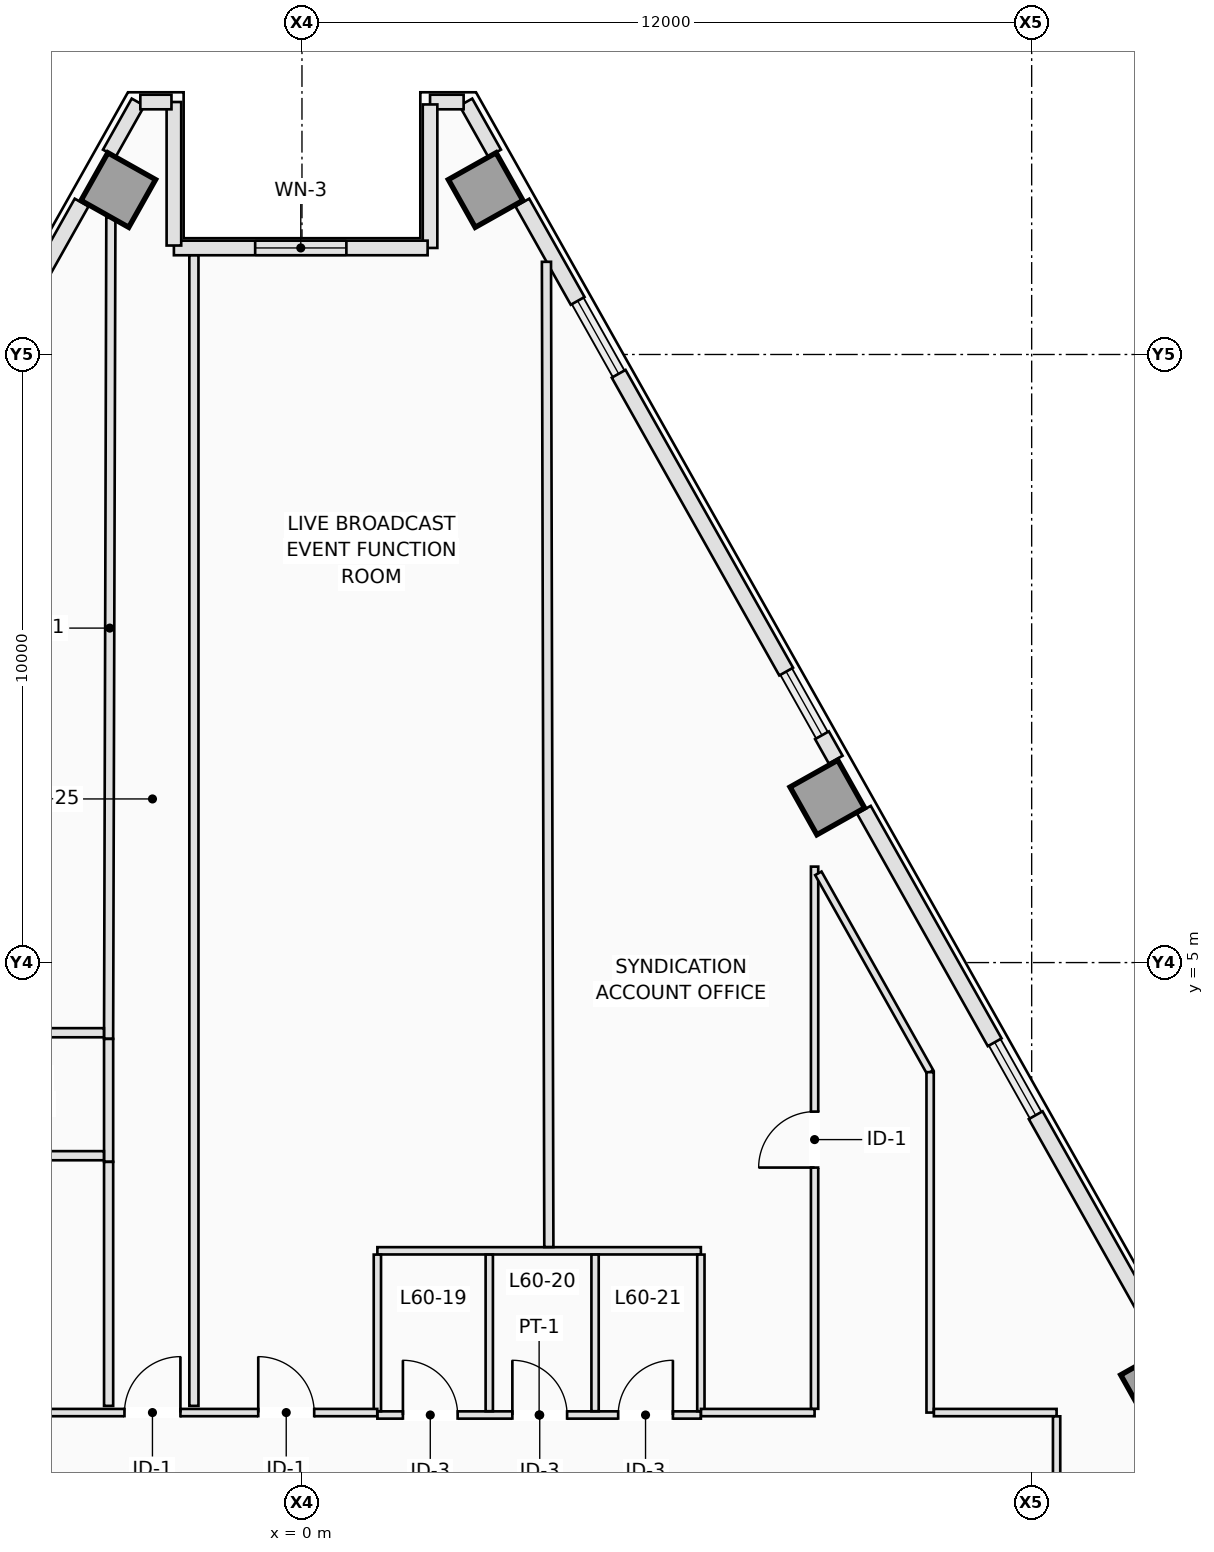
"""IFC4 building model, lengths in metres.
Left out: names, types, materials, properties, quantities, classifications, styles, units other than length and angle.
Written with IfcOpenShell. Run it as: python <this file> out.ifc"""

import sys

from ifc_helpers import new_model, si_unit, direction, frame, frame_2d, origin, origin_2d, place, context, subcontext, project, spatial, rectangle, extrude, element, fill, save


model = new_model("IFC4")
c1 = context("Model", 3, precision=1e-05, world=origin(), true_north=direction((0.0, 1.0)))
c2 = subcontext(c1, "Body", "Model", "MODEL_VIEW")
j1 = project(units=[si_unit("LENGTHUNIT", "METRE"), si_unit("PLANEANGLEUNIT", "RADIAN")], contexts=[c1])
p1 = place(None, origin())
s1 = spatial("IfcSite", under=j1, at=p1, CompositionType="ELEMENT")
p2 = place(p1, origin())
s2 = spatial("IfcBuilding", under=s1, at=p2, CompositionType="ELEMENT")
p3 = place(p2, frame((0.0, 0.0, 218.4)))
s3 = spatial("IfcBuildingStorey", under=s2, at=p3, CompositionType="ELEMENT", Elevation=218.4)
for number, where, z_axis, x_axis in (
    (1, (14.077, -1.952, 0.0), (0.0, 0.0, 1.0), (0.872, 0.49, 0.0)),
    (2, (8.64, 7.715, 0.0), (0.0, 0.0, 1.0), (0.872, 0.49, 0.0)),
    (3, (3.021, 17.704, 0.0), (0.0, 0.0, 1.0), (0.872, 0.49, 0.0)),
    (4, (-3.021, 17.704, 0.0), (0.0, 0.0, 1.0), (-0.872, 0.49, 0.0)),
):
    element("IfcColumn", number, at=place(p3, frame(where, z_axis=z_axis, x_axis=x_axis)), inside=s3, PredefinedType="COLUMN", context=c2, shape_type="SweptSolid", body=[
        extrude(rectangle(XDim=0.9, YDim=0.9, at=origin_2d()), origin(), (0.0, 0.0, 1.0), 3.5),
    ])
p4 = place(p3, frame((2.695, 19.149, 0.0), z_axis=(0.0, 0.0, 1.0), x_axis=(0.490345412687, -0.87152818443, 0.0)))
e5 = element("IfcWall", 5, at=p4, inside=s3, PredefinedType="STANDARD", context=c2, shape_type="SweptSolid", body=[
    extrude(rectangle(XDim=0.964, YDim=0.24, at=frame_2d((0.482, 0.0))), origin(), (0.0, 0.0, 1.0), 3.25),
])
p5 = place(p3, frame((3.624, 17.499, 0.0), z_axis=(0.0, 0.0, 1.0), x_axis=(0.490261239633, -0.871575537125, 0.0)))
e6 = element("IfcWall", 6, at=p5, inside=s3, PredefinedType="STANDARD", context=c2, shape_type="SweptSolid", body=[
    extrude(rectangle(XDim=1.855, YDim=0.26, at=frame_2d((0.928, 0.0))), origin(), (0.0, 0.0, 1.0), 3.25),
])
p6 = place(p3, frame((5.208, 14.682, 0.0), z_axis=(0.0, 0.0, 1.0), x_axis=(0.490240608828, -0.871587141631, 0.0)))
e7 = element("IfcWall", 7, at=p6, inside=s3, PredefinedType="STANDARD", context=c2, shape_type="SweptSolid", body=[
    extrude(rectangle(XDim=5.618, YDim=0.26, at=frame_2d((2.809, 0.0))), origin(), (0.0, 0.0, 1.0), 3.25),
])
p7 = place(p3, frame((8.552, 8.738, 0.0), z_axis=(0.0, 0.0, 1.0), x_axis=(0.490412424957, -0.871490478116, 0.0)))
e8 = element("IfcWall", 8, at=p7, inside=s3, PredefinedType="STANDARD", context=c2, shape_type="SweptSolid", body=[
    extrude(rectangle(XDim=0.46, YDim=0.26, at=frame_2d((0.23, 0.0))), origin(), (0.0, 0.0, 1.0), 3.25),
])
p8 = place(p3, frame((9.24, 7.514, 0.0), z_axis=(0.0, 0.0, 1.0), x_axis=(0.490237464814, -0.871588910033, 0.0)))
e9 = element("IfcWall", 9, at=p8, inside=s3, PredefinedType="STANDARD", context=c2, shape_type="SweptSolid", body=[
    extrude(rectangle(XDim=4.388, YDim=0.26, at=frame_2d((2.194, 0.0))), origin(), (0.0, 0.0, 1.0), 3.25),
])
p9 = place(p3, frame((12.066, 2.49, 0.0), z_axis=(0.0, 0.0, 1.0), x_axis=(0.490261239633, -0.871575537125, 0.0)))
e10 = element("IfcWall", 10, at=p9, inside=s3, PredefinedType="STANDARD", context=c2, shape_type="SweptSolid", body=[
    extrude(rectangle(XDim=4.388, YDim=0.26, at=frame_2d((2.194, 0.0))), origin(), (0.0, 0.0, 1.0), 3.25),
])
p10 = place(p3, frame((-3.168, 18.309, 0.0), z_axis=(0.0, 0.0, 1.0), x_axis=(0.490345412687, 0.87152818443, 0.0)))
e11 = element("IfcWall", 11, at=p10, inside=s3, PredefinedType="STANDARD", context=c2, shape_type="SweptSolid", body=[
    extrude(rectangle(XDim=0.964, YDim=0.24, at=frame_2d((0.482, 0.0))), origin(), (0.0, 0.0, 1.0), 3.25),
])
p11 = place(p3, frame((-4.533, 15.882, 0.0), z_axis=(0.0, 0.0, 1.0), x_axis=(0.490261239633, 0.871575537125, 0.0)))
e12 = element("IfcWall", 12, at=p11, inside=s3, PredefinedType="STANDARD", context=c2, shape_type="SweptSolid", body=[
    extrude(rectangle(XDim=1.855, YDim=0.26, at=frame_2d((0.928, 0.0))), origin(), (0.0, 0.0, 1.0), 3.25),
])
p12 = place(p3, frame((2.658, 19.152, 0.0), z_axis=(0.0, 0.0, 1.0), x_axis=(-1.0, 0.0, 0.0)))
e13 = element("IfcWall", 13, at=p12, inside=s3, PredefinedType="STANDARD", context=c2, shape_type="SweptSolid", body=[
    extrude(rectangle(XDim=0.552, YDim=0.24, at=frame_2d((0.276, 0.0))), origin(), (0.0, 0.0, 1.0), 3.25),
])
p13 = place(p3, frame((2.106, 19.112, 0.0), z_axis=(0.0, 0.0, 1.0), x_axis=(0.0, -1.0, 0.0)))
e14 = element("IfcWall", 14, at=p13, inside=s3, PredefinedType="STANDARD", context=c2, shape_type="SweptSolid", body=[
    extrude(rectangle(XDim=2.36, YDim=0.24, at=frame_2d((1.18, 0.0))), origin(), (0.0, 0.0, 1.0), 3.25),
])
p14 = place(p3, frame((2.066, 16.752, 0.0), z_axis=(0.0, 0.0, 1.0), x_axis=(-1.0, 0.0, 0.0)))
e15 = element("IfcWall", 15, at=p14, inside=s3, PredefinedType="STANDARD", context=c2, shape_type="SweptSolid", body=[
    extrude(rectangle(XDim=4.172, YDim=0.24, at=frame_2d((2.086, 0.0))), origin(), (0.0, 0.0, 1.0), 3.25),
])
p15 = place(p14, frame((1.336, 0.0, 0.9)))
e16 = element("IfcOpeningElement", 16, at=p15, cuts=e15, PredefinedType="OPENING", context=c2, shape_type="SweptSolid", body=[
    extrude(rectangle(XDim=1.5, YDim=1.95, at=frame_2d((0.75, 0.975))), frame((0.0, 0.13, 0.0), z_axis=(0.0, -1.0, 0.0), x_axis=(1.0, 0.0, 0.0)), (0.0, 0.0, 1.0), 0.26),
])
p16 = place(p3, frame((-2.106, 16.792, 0.0), z_axis=(0.0, 0.0, 1.0), x_axis=(0.0, 1.0, 0.0)))
e17 = element("IfcWall", 17, at=p16, inside=s3, PredefinedType="STANDARD", context=c2, shape_type="SweptSolid", body=[
    extrude(rectangle(XDim=2.36, YDim=0.24, at=frame_2d((1.18, 0.0))), origin(), (0.0, 0.0, 1.0), 3.25),
])
p17 = place(p3, frame((-2.146, 19.152, 0.0), z_axis=(0.0, 0.0, 1.0), x_axis=(-1.0, 0.0, 0.0)))
e18 = element("IfcWall", 18, at=p17, inside=s3, PredefinedType="STANDARD", context=c2, shape_type="SweptSolid", body=[
    extrude(rectangle(XDim=0.512, YDim=0.24, at=frame_2d((0.256, 0.0))), origin(), (0.0, 0.0, 1.0), 3.25),
])
p18 = place(p3, frame((1.24, -2.44, 0.0), z_axis=(0.0, 0.0, 1.0), x_axis=(1.0, 0.0, 0.0)))
e19 = element("IfcWall", 19, at=p18, inside=s3, PredefinedType="PARTITIONING", context=c2, shape_type="SweptSolid", body=[
    extrude(rectangle(XDim=5.32, YDim=0.12, at=frame_2d((2.66, 0.0))), origin(), (0.0, 0.0, 1.0), 2.943),
])
p19 = place(p18, frame((0.42, 0.0, 0.0)))
e20 = element("IfcOpeningElement", 20, at=p19, cuts=e19, PredefinedType="OPENING", context=c2, shape_type="SweptSolid", body=[
    extrude(rectangle(XDim=0.9, YDim=2.12, at=frame_2d((0.45, 1.06))), frame((0.0, 0.07, 0.0), z_axis=(0.0, -1.0, 0.0), x_axis=(1.0, 0.0, 0.0)), (0.0, 0.0, 1.0), 0.14),
])
p20 = place(p18, frame((2.22, 0.0, 0.0)))
e21 = element("IfcOpeningElement", 21, at=p20, cuts=e19, PredefinedType="OPENING", context=c2, shape_type="SweptSolid", body=[
    extrude(rectangle(XDim=0.9, YDim=2.12, at=frame_2d((0.45, 1.06))), frame((0.0, 0.07, 0.0), z_axis=(0.0, -1.0, 0.0), x_axis=(1.0, 0.0, 0.0)), (0.0, 0.0, 1.0), 0.14),
])
p21 = place(p18, frame((3.96, 0.0, 0.0)))
e22 = element("IfcOpeningElement", 22, at=p21, cuts=e19, PredefinedType="OPENING", context=c2, shape_type="SweptSolid", body=[
    extrude(rectangle(XDim=0.9, YDim=2.12, at=frame_2d((0.45, 1.06))), frame((0.0, 0.07, 0.0), z_axis=(0.0, -1.0, 0.0), x_axis=(1.0, 0.0, 0.0)), (0.0, 0.0, 1.0), 0.14),
])
p22 = place(p3, frame((1.24, 0.26, 0.0), z_axis=(0.0, 0.0, 1.0), x_axis=(1.0, 0.0, 0.0)))
e23 = element("IfcWall", 23, at=p22, inside=s3, PredefinedType="PARTITIONING", context=c2, shape_type="SweptSolid", body=[
    extrude(rectangle(XDim=5.32, YDim=0.12, at=frame_2d((2.66, 0.0))), origin(), (0.0, 0.0, 1.0), 3.25),
])
for number, where, z_axis, x_axis in (
    (24, (1.24, -2.378, 0.0), (0.0, 0.0, 1.0), (0.0, 1.0, 0.0)),
    (25, (3.08, -2.378, 0.0), (0.0, 0.0, 1.0), (0.0, 1.0, 0.0)),
    (26, (4.82, -2.378, 0.0), (0.0, 0.0, 1.0), (0.0, 1.0, 0.0)),
    (27, (6.56, -2.378, 0.0), (0.0, 0.0, 1.0), (0.0, 1.0, 0.0)),
):
    element("IfcWall", number, at=place(p3, frame(where, z_axis=z_axis, x_axis=x_axis)), inside=s3, PredefinedType="PARTITIONING", context=c2, shape_type="SweptSolid", body=[
        extrude(rectangle(XDim=2.576, YDim=0.12, at=frame_2d((1.288, 0.0))), origin(), (0.0, 0.0, 1.0), 3.25),
    ])
p23 = place(p3, frame((-8.508, -2.4, 0.0), z_axis=(0.0, 0.0, 1.0), x_axis=(1.0, 0.0, 0.0)))
e28 = element("IfcWall", 28, at=p23, inside=s3, PredefinedType="PARTITIONING", context=c2, shape_type="SweptSolid", body=[
    extrude(rectangle(XDim=9.746, YDim=0.12, at=frame_2d((4.873, 0.0))), origin(), (0.0, 0.0, 1.0), 2.943),
])
p24 = place(p23, frame((7.789, 0.0, 0.0)))
e29 = element("IfcOpeningElement", 29, at=p24, cuts=e28, PredefinedType="OPENING", context=c2, shape_type="SweptSolid", body=[
    extrude(rectangle(XDim=0.92, YDim=2.12, at=frame_2d((0.46, 1.06))), frame((0.0, 0.07, 0.0), z_axis=(0.0, -1.0, 0.0), x_axis=(1.0, 0.0, 0.0)), (0.0, 0.0, 1.0), 0.14),
])
p25 = place(p23, frame((5.589, 0.0, 0.0)))
e30 = element("IfcOpeningElement", 30, at=p25, cuts=e28, PredefinedType="OPENING", context=c2, shape_type="SweptSolid", body=[
    extrude(rectangle(XDim=0.92, YDim=2.12, at=frame_2d((0.46, 1.06))), frame((0.0, 0.07, 0.0), z_axis=(0.0, -1.0, 0.0), x_axis=(1.0, 0.0, 0.0)), (0.0, 0.0, 1.0), 0.14),
])
p26 = place(p23, frame((2.302, 0.0, 0.0)))
e31 = element("IfcOpeningElement", 31, at=p26, cuts=e28, PredefinedType="OPENING", context=c2, shape_type="SweptSolid", body=[
    extrude(rectangle(XDim=0.92, YDim=2.12, at=frame_2d((0.46, 1.06))), frame((0.0, 0.07, 0.0), z_axis=(0.0, -1.0, 0.0), x_axis=(1.0, 0.0, 0.0)), (0.0, 0.0, 1.0), 0.14),
])
p27 = place(p3, frame((6.562, -2.4, 0.0), z_axis=(0.0, 0.0, 1.0), x_axis=(1.0, 0.0, 0.0)))
e32 = element("IfcWall", 32, at=p27, inside=s3, PredefinedType="PARTITIONING", context=c2, shape_type="SweptSolid", body=[
    extrude(rectangle(XDim=1.868, YDim=0.12, at=frame_2d((0.934, 0.0))), origin(), (0.0, 0.0, 1.0), 3.25),
])
p28 = place(p3, frame((8.43, -2.338, 0.0), z_axis=(0.0, 0.0, 1.0), x_axis=(0.0, 1.0, 0.0)))
e33 = element("IfcWall", 33, at=p28, inside=s3, PredefinedType="PARTITIONING", context=c2, shape_type="SweptSolid", body=[
    extrude(rectangle(XDim=8.916, YDim=0.12, at=frame_2d((4.458, 0.0))), origin(), (0.0, 0.0, 1.0), 3.25),
])
p29 = place(p28, frame((3.967, 0.0, 0.0)))
e34 = element("IfcOpeningElement", 34, at=p29, cuts=e33, PredefinedType="OPENING", context=c2, shape_type="SweptSolid", body=[
    extrude(rectangle(XDim=0.92, YDim=2.12, at=frame_2d((0.46, 1.06))), frame((0.0, 0.07, 0.0), z_axis=(0.0, -1.0, 0.0), x_axis=(1.0, 0.0, 0.0)), (0.0, 0.0, 1.0), 0.14),
])
p30 = place(p3, frame((8.492, 6.468, 0.0), z_axis=(0.0, 0.0, 1.0), x_axis=(0.49025814807, -0.871577276121, 0.0)))
e35 = element("IfcWall", 35, at=p30, inside=s3, PredefinedType="PARTITIONING", context=c2, shape_type="SweptSolid", body=[
    extrude(rectangle(XDim=3.749, YDim=0.12, at=frame_2d((1.875, 0.0))), origin(), (0.0, 0.0, 1.0), 3.25),
])
p31 = place(p3, frame((10.33, 3.198, 0.0), z_axis=(0.0, 0.0, 1.0), x_axis=(0.0, -1.0, 0.0)))
e36 = element("IfcWall", 36, at=p31, inside=s3, PredefinedType="PARTITIONING", context=c2, shape_type="SweptSolid", body=[
    extrude(rectangle(XDim=5.598, YDim=0.12, at=frame_2d((2.799, 0.0))), origin(), (0.0, 0.0, 1.0), 3.25),
])
p32 = place(p3, frame((10.392, -2.4, 0.0), z_axis=(0.0, 0.0, 1.0), x_axis=(1.0, 0.0, 0.0)))
e37 = element("IfcWall", 37, at=p32, inside=s3, PredefinedType="PARTITIONING", context=c2, shape_type="SweptSolid", body=[
    extrude(rectangle(XDim=2.018, YDim=0.12, at=frame_2d((1.009, 0.0))), origin(), (0.0, 0.0, 1.0), 3.25),
])
p33 = place(p3, frame((12.41, -2.462, 0.0), z_axis=(0.0, 0.0, 1.0), x_axis=(0.0, -1.0, 0.0)))
e38 = element("IfcWall", 38, at=p33, inside=s3, PredefinedType="PARTITIONING", context=c2, shape_type="SweptSolid", body=[
    extrude(rectangle(XDim=2.611, YDim=0.12, at=frame_2d((1.306, 0.0))), origin(), (0.0, 0.0, 1.0), 3.25),
])
p34 = place(p3, frame((-3.143, 17.254, 0.0), z_axis=(0.0, 0.0, 1.0), x_axis=(-0.002783390028, -0.999996126362, 0.0)))
e39 = element("IfcWall", 39, at=p34, inside=s3, PredefinedType="PARTITIONING", context=c2, shape_type="SweptSolid", body=[
    extrude(rectangle(XDim=13.508, YDim=0.15, at=frame_2d((6.754, 0.0))), origin(), (0.0, 0.0, 1.0), 2.722),
])
p35 = place(p3, frame((-3.257, 3.846, 0.0), z_axis=(0.0, 0.0, 1.0), x_axis=(-1.0, 0.0, 0.0)))
e40 = element("IfcWall", 40, at=p35, inside=s3, PredefinedType="PARTITIONING", context=c2, shape_type="SweptSolid", body=[
    extrude(rectangle(XDim=5.203, YDim=0.15, at=frame_2d((2.602, 0.0))), origin(), (0.0, 0.0, 1.0), 2.943),
])
p36 = place(p3, frame((-1.777, -2.29, 0.0), z_axis=(0.0, 0.0, 1.0), x_axis=(0.0, 1.0, 0.0)))
e41 = element("IfcWall", 41, at=p36, inside=s3, PredefinedType="PARTITIONING", context=c2, shape_type="SweptSolid", body=[
    extrude(rectangle(XDim=18.92, YDim=0.15, at=frame_2d((9.46, 0.0))), origin(), (0.0, 0.0, 1.0), 3.25),
])
p37 = place(p3, frame((4.021, 16.524, 0.0), z_axis=(0.0, 0.0, 1.0), x_axis=(0.002426006965, -0.999997057241, 0.0)))
e42 = element("IfcWall", 42, at=p37, inside=s3, PredefinedType="PARTITIONING", context=c2, shape_type="SweptSolid", body=[
    extrude(rectangle(XDim=16.202, YDim=0.15, at=frame_2d((8.101, 0.0))), origin(), (0.0, 0.0, 1.0), 3.25),
])
p38 = place(p3, frame((-3.18, 1.724, 0.0), z_axis=(0.0, 0.0, 1.0), x_axis=(0.0, 1.0, 0.0)))
e43 = element("IfcWall", 43, at=p38, inside=s3, PredefinedType="PARTITIONING", context=c2, shape_type="SweptSolid", body=[
    extrude(rectangle(XDim=2.02, YDim=0.15, at=frame_2d((1.01, 0.0))), origin(), (0.0, 0.0, 1.0), 3.25),
])
p39 = place(p3, frame((-3.18, -2.29, 0.0), z_axis=(0.0, 0.0, 1.0), x_axis=(0.0, 1.0, 0.0)))
e44 = element("IfcWall", 44, at=p39, inside=s3, PredefinedType="PARTITIONING", context=c2, shape_type="SweptSolid", body=[
    extrude(rectangle(XDim=4.012, YDim=0.15, at=frame_2d((2.006, 0.0))), origin(), (0.0, 0.0, 1.0), 3.25),
])
p40 = place(p3, frame((-3.257, 1.824, 0.0), z_axis=(0.0, 0.0, 1.0), x_axis=(-1.0, 0.0, 0.0)))
e45 = element("IfcWall", 45, at=p40, inside=s3, PredefinedType="PARTITIONING", context=c2, shape_type="SweptSolid", body=[
    extrude(rectangle(XDim=5.203, YDim=0.15, at=frame_2d((2.602, 0.0))), origin(), (0.0, 0.0, 1.0), 3.25),
])
p41 = place(p15, origin())
e46 = element("IfcWindow", 46, at=p41, inside=s3, PartitioningType="SINGLE_PANEL", PredefinedType="WINDOW", context=c2, shape_type="SweptSolid", body=[
    extrude(rectangle(XDim=1.5, YDim=1.95, at=frame_2d((0.75, 0.975))), frame((0.0, 0.03, 0.0), z_axis=(0.0, -1.0, 0.0), x_axis=(1.0, 0.0, 0.0)), (0.0, 0.0, 1.0), 0.06),
])
fill(e16, e46)
p42 = place(p19, origin())
e47 = element("IfcDoor", 47, at=p42, inside=s3, OperationType="SINGLE_SWING_LEFT", PredefinedType="DOOR", context=c2, shape_type="SweptSolid", body=[
    extrude(rectangle(XDim=0.9, YDim=2.12, at=frame_2d((0.45, 1.06))), frame((0.0, 0.025, 0.0), z_axis=(0.0, -1.0, 0.0), x_axis=(1.0, 0.0, 0.0)), (0.0, 0.0, 1.0), 0.05),
])
fill(e20, e47)
p43 = place(p20, origin())
e48 = element("IfcDoor", 48, at=p43, inside=s3, OperationType="SINGLE_SWING_LEFT", PredefinedType="DOOR", context=c2, shape_type="SweptSolid", body=[
    extrude(rectangle(XDim=0.9, YDim=2.12, at=frame_2d((0.45, 1.06))), frame((0.0, 0.025, 0.0), z_axis=(0.0, -1.0, 0.0), x_axis=(1.0, 0.0, 0.0)), (0.0, 0.0, 1.0), 0.05),
])
fill(e21, e48)
p44 = place(p21, origin())
e49 = element("IfcDoor", 49, at=p44, inside=s3, OperationType="SINGLE_SWING_RIGHT", PredefinedType="DOOR", context=c2, shape_type="SweptSolid", body=[
    extrude(rectangle(XDim=0.9, YDim=2.12, at=frame_2d((0.45, 1.06))), frame((0.0, 0.025, 0.0), z_axis=(0.0, -1.0, 0.0), x_axis=(1.0, 0.0, 0.0)), (0.0, 0.0, 1.0), 0.05),
])
fill(e22, e49)
p45 = place(p24, origin())
e50 = element("IfcDoor", 50, at=p45, inside=s3, OperationType="SINGLE_SWING_LEFT", PredefinedType="DOOR", context=c2, shape_type="SweptSolid", body=[
    extrude(rectangle(XDim=0.92, YDim=2.12, at=frame_2d((0.46, 1.06))), frame((0.0, 0.025, 0.0), z_axis=(0.0, -1.0, 0.0), x_axis=(1.0, 0.0, 0.0)), (0.0, 0.0, 1.0), 0.05),
])
fill(e29, e50)
p46 = place(p25, origin())
e51 = element("IfcDoor", 51, at=p46, inside=s3, OperationType="SINGLE_SWING_RIGHT", PredefinedType="DOOR", context=c2, shape_type="SweptSolid", body=[
    extrude(rectangle(XDim=0.92, YDim=2.12, at=frame_2d((0.46, 1.06))), frame((0.0, 0.025, 0.0), z_axis=(0.0, -1.0, 0.0), x_axis=(1.0, 0.0, 0.0)), (0.0, 0.0, 1.0), 0.05),
])
fill(e30, e51)
p47 = place(p29, origin())
e52 = element("IfcDoor", 52, at=p47, inside=s3, OperationType="SINGLE_SWING_LEFT", PredefinedType="DOOR", context=c2, shape_type="SweptSolid", body=[
    extrude(rectangle(XDim=0.92, YDim=2.12, at=frame_2d((0.46, 1.06))), frame((0.0, 0.025, 0.0), z_axis=(0.0, -1.0, 0.0), x_axis=(1.0, 0.0, 0.0)), (0.0, 0.0, 1.0), 0.05),
])
fill(e34, e52)
save(model, sys.argv[1])
